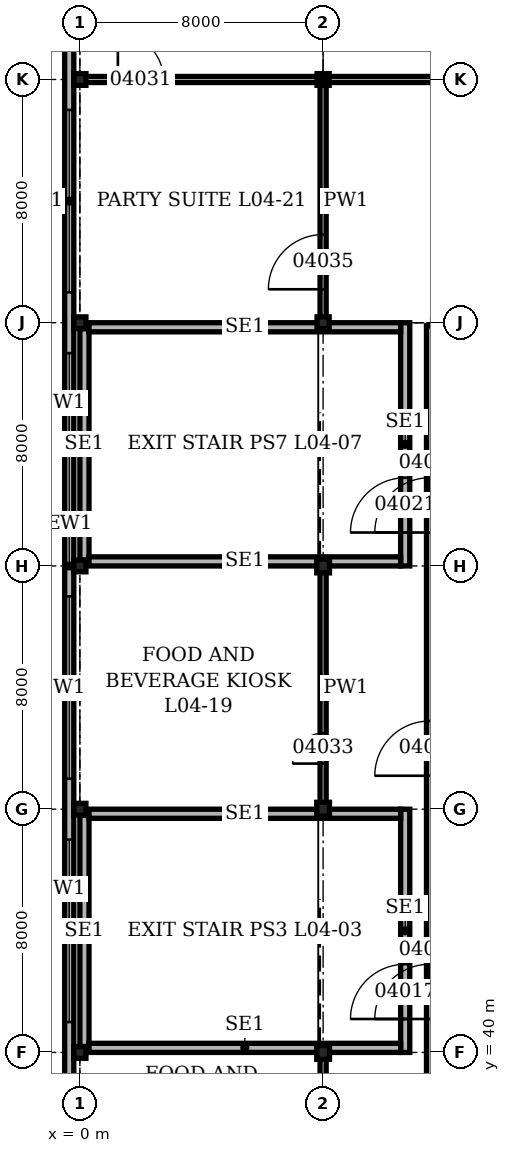
"""IFC4 building model, lengths in metres.
Left out: names, types, materials, properties, quantities, classifications, styles, units other than length and angle.
Written with IfcOpenShell. Run it as: python <this file> out.ifc"""

import sys

from ifc_helpers import new_model, si_unit, direction, frame, frame_2d, origin, origin_2d, place, context, subcontext, project, spatial, rectangle, i_section, extrude, element, fill, save


model = new_model("IFC4")
c1 = context("Model", 3, precision=1e-05, world=origin(), true_north=direction((0.0, 1.0)))
c2 = subcontext(c1, "Body", "Model", "MODEL_VIEW")
j1 = project(units=[si_unit("LENGTHUNIT", "METRE"), si_unit("PLANEANGLEUNIT", "RADIAN")], contexts=[c1])
p1 = place(None, origin())
s1 = spatial("IfcSite", under=j1, at=p1, CompositionType="ELEMENT")
p2 = place(p1, origin())
s2 = spatial("IfcBuilding", under=s1, at=p2, CompositionType="ELEMENT")
p3 = place(p2, frame((0.0, 0.0, 19.9)))
s3 = spatial("IfcBuildingStorey", under=s2, at=p3, CompositionType="ELEMENT", Elevation=19.9)
for number, where, z_axis, x_axis in (
    (1, (0.0, 40.0, 0.0), (0.0, 0.0, 1.0), (1.0, 0.0, 0.0)),
    (2, (0.0, 48.0, 0.0), (0.0, 0.0, 1.0), (1.0, 0.0, 0.0)),
    (3, (0.0, 56.0, 0.0), (0.0, 0.0, 1.0), (1.0, 0.0, 0.0)),
    (4, (0.0, 64.0, 0.0), (0.0, 0.0, 1.0), (1.0, 0.0, 0.0)),
    (5, (0.0, 72.0, 0.0), (0.0, 0.0, 1.0), (1.0, 0.0, 0.0)),
):
    element("IfcColumn", number, at=place(p3, frame(where, z_axis=z_axis, x_axis=x_axis)), inside=s3, PredefinedType="COLUMN", context=c2, shape_type="SweptSolid", body=[
        extrude(i_section(OverallWidth=0.399, OverallDepth=0.386, WebThickness=0.021, FlangeThickness=0.033, at=origin_2d()), origin(), (0.0, 0.0, 1.0), 6.0),
    ])
for number, where, z_axis, x_axis in (
    (6, (8.0, 40.0, 0.0), (0.0, 0.0, 1.0), (1.0, 0.0, 0.0)),
    (7, (8.0, 48.0, 0.0), (0.0, 0.0, 1.0), (1.0, 0.0, 0.0)),
    (8, (8.0, 56.0, 0.0), (0.0, 0.0, 1.0), (1.0, 0.0, 0.0)),
):
    element("IfcColumn", number, at=place(p3, frame(where, z_axis=z_axis, x_axis=x_axis)), inside=s3, PredefinedType="COLUMN", context=c2, shape_type="SweptSolid", body=[
        extrude(i_section(OverallWidth=0.419, OverallDepth=0.455, WebThickness=0.042, FlangeThickness=0.068, at=origin_2d()), origin(), (0.0, 0.0, 1.0), 6.0),
    ])
for number, where, z_axis, x_axis in (
    (9, (8.0, 64.0, 0.0), (0.0, 0.0, 1.0), (1.0, 0.0, 0.0)),
    (10, (8.0, 72.0, 0.0), (0.0, 0.0, 1.0), (1.0, 0.0, 0.0)),
):
    element("IfcColumn", number, at=place(p3, frame(where, z_axis=z_axis, x_axis=x_axis)), inside=s3, PredefinedType="COLUMN", context=c2, shape_type="SweptSolid", body=[
        extrude(i_section(OverallWidth=0.399, OverallDepth=0.386, WebThickness=0.021, FlangeThickness=0.033, at=origin_2d()), origin(), (0.0, 0.0, 1.0), 6.0),
    ])
p4 = place(p3, frame((-0.35, 112.35, 0.0), z_axis=(0.0, 0.0, 1.0), x_axis=(0.0, -1.0, 0.0)))
e11 = element("IfcWall", 11, at=p4, inside=s3, PredefinedType="SOLIDWALL", context=c2, shape_type="SweptSolid", body=[
    extrude(rectangle(XDim=112.7, YDim=0.3, at=frame_2d((56.35, 0.0))), origin(), (0.0, 0.0, 1.0), 6.0),
])
p5 = place(p4, frame((1.35, 0.0, 1.0)))
e12 = element("IfcOpeningElement", 12, at=p5, cuts=e11, PredefinedType="OPENING", context=c2, shape_type="SweptSolid", body=[
    extrude(rectangle(XDim=6.0, YDim=1.5, at=frame_2d((3.0, 0.75))), frame((0.0, 0.16, 0.0), z_axis=(0.0, -1.0, 0.0), x_axis=(1.0, 0.0, 0.0)), (0.0, 0.0, 1.0), 0.32),
])
p6 = place(p4, frame((9.35, 0.0, 1.0)))
e13 = element("IfcOpeningElement", 13, at=p6, cuts=e11, PredefinedType="OPENING", context=c2, shape_type="SweptSolid", body=[
    extrude(rectangle(XDim=6.0, YDim=1.5, at=frame_2d((3.0, 0.75))), frame((0.0, 0.16, 0.0), z_axis=(0.0, -1.0, 0.0), x_axis=(1.0, 0.0, 0.0)), (0.0, 0.0, 1.0), 0.32),
])
p7 = place(p4, frame((17.35, 0.0, 1.0)))
e14 = element("IfcOpeningElement", 14, at=p7, cuts=e11, PredefinedType="OPENING", context=c2, shape_type="SweptSolid", body=[
    extrude(rectangle(XDim=6.0, YDim=1.5, at=frame_2d((3.0, 0.75))), frame((0.0, 0.16, 0.0), z_axis=(0.0, -1.0, 0.0), x_axis=(1.0, 0.0, 0.0)), (0.0, 0.0, 1.0), 0.32),
])
p8 = place(p4, frame((25.35, 0.0, 1.0)))
e15 = element("IfcOpeningElement", 15, at=p8, cuts=e11, PredefinedType="OPENING", context=c2, shape_type="SweptSolid", body=[
    extrude(rectangle(XDim=6.0, YDim=1.5, at=frame_2d((3.0, 0.75))), frame((0.0, 0.16, 0.0), z_axis=(0.0, -1.0, 0.0), x_axis=(1.0, 0.0, 0.0)), (0.0, 0.0, 1.0), 0.32),
])
p9 = place(p4, frame((33.35, 0.0, 1.0)))
e16 = element("IfcOpeningElement", 16, at=p9, cuts=e11, PredefinedType="OPENING", context=c2, shape_type="SweptSolid", body=[
    extrude(rectangle(XDim=6.0, YDim=1.5, at=frame_2d((3.0, 0.75))), frame((0.0, 0.16, 0.0), z_axis=(0.0, -1.0, 0.0), x_axis=(1.0, 0.0, 0.0)), (0.0, 0.0, 1.0), 0.32),
])
p10 = place(p4, frame((41.35, 0.0, 1.0)))
e17 = element("IfcOpeningElement", 17, at=p10, cuts=e11, PredefinedType="OPENING", context=c2, shape_type="SweptSolid", body=[
    extrude(rectangle(XDim=6.0, YDim=1.5, at=frame_2d((3.0, 0.75))), frame((0.0, 0.16, 0.0), z_axis=(0.0, -1.0, 0.0), x_axis=(1.0, 0.0, 0.0)), (0.0, 0.0, 1.0), 0.32),
])
p11 = place(p4, frame((49.35, 0.0, 1.0)))
e18 = element("IfcOpeningElement", 18, at=p11, cuts=e11, PredefinedType="OPENING", context=c2, shape_type="SweptSolid", body=[
    extrude(rectangle(XDim=6.0, YDim=1.5, at=frame_2d((3.0, 0.75))), frame((0.0, 0.16, 0.0), z_axis=(0.0, -1.0, 0.0), x_axis=(1.0, 0.0, 0.0)), (0.0, 0.0, 1.0), 0.32),
])
p12 = place(p4, frame((57.35, 0.0, 1.0)))
e19 = element("IfcOpeningElement", 19, at=p12, cuts=e11, PredefinedType="OPENING", context=c2, shape_type="SweptSolid", body=[
    extrude(rectangle(XDim=6.0, YDim=1.5, at=frame_2d((3.0, 0.75))), frame((0.0, 0.16, 0.0), z_axis=(0.0, -1.0, 0.0), x_axis=(1.0, 0.0, 0.0)), (0.0, 0.0, 1.0), 0.32),
])
p13 = place(p4, frame((65.35, 0.0, 1.0)))
e20 = element("IfcOpeningElement", 20, at=p13, cuts=e11, PredefinedType="OPENING", context=c2, shape_type="SweptSolid", body=[
    extrude(rectangle(XDim=6.0, YDim=1.5, at=frame_2d((3.0, 0.75))), frame((0.0, 0.16, 0.0), z_axis=(0.0, -1.0, 0.0), x_axis=(1.0, 0.0, 0.0)), (0.0, 0.0, 1.0), 0.32),
])
p14 = place(p4, frame((73.35, 0.0, 1.0)))
e21 = element("IfcOpeningElement", 21, at=p14, cuts=e11, PredefinedType="OPENING", context=c2, shape_type="SweptSolid", body=[
    extrude(rectangle(XDim=6.0, YDim=1.5, at=frame_2d((3.0, 0.75))), frame((0.0, 0.16, 0.0), z_axis=(0.0, -1.0, 0.0), x_axis=(1.0, 0.0, 0.0)), (0.0, 0.0, 1.0), 0.32),
])
p15 = place(p4, frame((81.35, 0.0, 1.0)))
e22 = element("IfcOpeningElement", 22, at=p15, cuts=e11, PredefinedType="OPENING", context=c2, shape_type="SweptSolid", body=[
    extrude(rectangle(XDim=6.0, YDim=1.5, at=frame_2d((3.0, 0.75))), frame((0.0, 0.16, 0.0), z_axis=(0.0, -1.0, 0.0), x_axis=(1.0, 0.0, 0.0)), (0.0, 0.0, 1.0), 0.32),
])
p16 = place(p4, frame((89.35, 0.0, 1.0)))
e23 = element("IfcOpeningElement", 23, at=p16, cuts=e11, PredefinedType="OPENING", context=c2, shape_type="SweptSolid", body=[
    extrude(rectangle(XDim=6.0, YDim=1.5, at=frame_2d((3.0, 0.75))), frame((0.0, 0.16, 0.0), z_axis=(0.0, -1.0, 0.0), x_axis=(1.0, 0.0, 0.0)), (0.0, 0.0, 1.0), 0.32),
])
p17 = place(p4, frame((97.35, 0.0, 1.0)))
e24 = element("IfcOpeningElement", 24, at=p17, cuts=e11, PredefinedType="OPENING", context=c2, shape_type="SweptSolid", body=[
    extrude(rectangle(XDim=6.0, YDim=1.5, at=frame_2d((3.0, 0.75))), frame((0.0, 0.16, 0.0), z_axis=(0.0, -1.0, 0.0), x_axis=(1.0, 0.0, 0.0)), (0.0, 0.0, 1.0), 0.32),
])
p18 = place(p4, frame((105.35, 0.0, 1.0)))
e25 = element("IfcOpeningElement", 25, at=p18, cuts=e11, PredefinedType="OPENING", context=c2, shape_type="SweptSolid", body=[
    extrude(rectangle(XDim=6.0, YDim=1.5, at=frame_2d((3.0, 0.75))), frame((0.0, 0.16, 0.0), z_axis=(0.0, -1.0, 0.0), x_axis=(1.0, 0.0, 0.0)), (0.0, 0.0, 1.0), 0.32),
])
p19 = place(p3, frame((0.15, 40.193, 0.0), z_axis=(0.0, 0.0, 1.0), x_axis=(0.0, 1.0, 0.0)))
e26 = element("IfcWall", 26, at=p19, inside=s3, PredefinedType="SOLIDWALL", context=c2, shape_type="SweptSolid", body=[
    extrude(rectangle(XDim=7.614, YDim=0.3, at=frame_2d((3.807, 0.0))), origin(), (0.0, 0.0, 1.0), 5.75),
])
p20 = place(p3, frame((10.7, 40.0, 0.0), z_axis=(0.0, 0.0, 1.0), x_axis=(0.0, 1.0, 0.0)))
e27 = element("IfcWall", 27, at=p20, inside=s3, PredefinedType="SOLIDWALL", context=c2, shape_type="SweptSolid", body=[
    extrude(rectangle(XDim=8.0, YDim=0.3, at=frame_2d((4.0, 0.0))), origin(), (0.0, 0.0, 1.0), 5.75),
])
p21 = place(p20, frame((1.1, 0.0, 0.0)))
e28 = element("IfcOpeningElement", 28, at=p21, cuts=e27, PredefinedType="OPENING", context=c2, shape_type="SweptSolid", body=[
    extrude(rectangle(XDim=1.8, YDim=2.1, at=frame_2d((0.9, 1.05))), frame((0.0, 0.16, 0.0), z_axis=(0.0, -1.0, 0.0), x_axis=(1.0, 0.0, 0.0)), (0.0, 0.0, 1.0), 0.32),
])
for number, where, z_axis, x_axis in (
    (29, (0.3, 40.15, 0.0), (0.0, 0.0, 1.0), (1.0, 0.0, 0.0)),
    (30, (0.3, 47.85, 0.0), (0.0, 0.0, 1.0), (1.0, 0.0, 0.0)),
):
    element("IfcWall", number, at=place(p3, frame(where, z_axis=z_axis, x_axis=x_axis)), inside=s3, PredefinedType="SOLIDWALL", context=c2, shape_type="SweptSolid", body=[
        extrude(rectangle(XDim=10.25, YDim=0.3, at=frame_2d((5.125, 0.0))), origin(), (0.0, 0.0, 1.0), 5.75),
    ])
p22 = place(p3, frame((0.15, 56.193, 0.0), z_axis=(0.0, 0.0, 1.0), x_axis=(0.0, 1.0, 0.0)))
e31 = element("IfcWall", 31, at=p22, inside=s3, PredefinedType="SOLIDWALL", context=c2, shape_type="SweptSolid", body=[
    extrude(rectangle(XDim=7.614, YDim=0.3, at=frame_2d((3.807, 0.0))), origin(), (0.0, 0.0, 1.0), 5.75),
])
p23 = place(p3, frame((10.7, 56.0, 0.0), z_axis=(0.0, 0.0, 1.0), x_axis=(0.0, 1.0, 0.0)))
e32 = element("IfcWall", 32, at=p23, inside=s3, PredefinedType="SOLIDWALL", context=c2, shape_type="SweptSolid", body=[
    extrude(rectangle(XDim=8.0, YDim=0.3, at=frame_2d((4.0, 0.0))), origin(), (0.0, 0.0, 1.0), 5.75),
])
p24 = place(p23, frame((1.1, 0.0, 0.0)))
e33 = element("IfcOpeningElement", 33, at=p24, cuts=e32, PredefinedType="OPENING", context=c2, shape_type="SweptSolid", body=[
    extrude(rectangle(XDim=1.8, YDim=2.1, at=frame_2d((0.9, 1.05))), frame((0.0, 0.16, 0.0), z_axis=(0.0, -1.0, 0.0), x_axis=(1.0, 0.0, 0.0)), (0.0, 0.0, 1.0), 0.32),
])
for number, where, z_axis, x_axis in (
    (34, (0.3, 56.15, 0.0), (0.0, 0.0, 1.0), (1.0, 0.0, 0.0)),
    (35, (0.3, 63.85, 0.0), (0.0, 0.0, 1.0), (1.0, 0.0, 0.0)),
):
    element("IfcWall", number, at=place(p3, frame(where, z_axis=z_axis, x_axis=x_axis)), inside=s3, PredefinedType="SOLIDWALL", context=c2, shape_type="SweptSolid", body=[
        extrude(rectangle(XDim=10.25, YDim=0.3, at=frame_2d((5.125, 0.0))), origin(), (0.0, 0.0, 1.0), 5.75),
    ])
p25 = place(p3, frame((0.0, 72.0, 0.0), z_axis=(0.0, 0.0, 1.0), x_axis=(1.0, 0.0, 0.0)))
e36 = element("IfcWall", 36, at=p25, inside=s3, PredefinedType="PARTITIONING", context=c2, shape_type="SweptSolid", body=[
    extrude(rectangle(XDim=16.0, YDim=0.2, at=frame_2d((8.0, 0.0))), origin(), (0.0, 0.0, 1.0), 4.978),
])
p26 = place(p25, frame((1.25, 0.0, 0.0)))
e37 = element("IfcOpeningElement", 37, at=p26, cuts=e36, PredefinedType="OPENING", context=c2, shape_type="SweptSolid", body=[
    extrude(rectangle(XDim=1.5, YDim=2.4, at=frame_2d((0.75, 1.2))), frame((0.0, 0.11, 0.0), z_axis=(0.0, -1.0, 0.0), x_axis=(1.0, 0.0, 0.0)), (0.0, 0.0, 1.0), 0.22),
])
p27 = place(p3, frame((8.0, -0.15, 0.0), z_axis=(0.0, 0.0, 1.0), x_axis=(0.0, 1.0, 0.0)))
e38 = element("IfcWall", 38, at=p27, inside=s3, PredefinedType="PARTITIONING", context=c2, shape_type="SweptSolid", body=[
    extrude(rectangle(XDim=40.05, YDim=0.2, at=frame_2d((20.025, 0.0))), origin(), (0.0, 0.0, 1.0), 4.978),
])
p28 = place(p27, frame((17.55, 0.0, 0.0)))
e39 = element("IfcOpeningElement", 39, at=p28, cuts=e38, PredefinedType="OPENING", context=c2, shape_type="SweptSolid", body=[
    extrude(rectangle(XDim=1.2, YDim=2.1, at=frame_2d((0.6, 1.05))), frame((0.0, 0.11, 0.0), z_axis=(0.0, -1.0, 0.0), x_axis=(1.0, 0.0, 0.0)), (0.0, 0.0, 1.0), 0.22),
])
p29 = place(p27, frame((27.05, 0.0, 0.0)))
e40 = element("IfcOpeningElement", 40, at=p29, cuts=e38, PredefinedType="OPENING", context=c2, shape_type="SweptSolid", body=[
    extrude(rectangle(XDim=1.2, YDim=2.1, at=frame_2d((0.6, 1.05))), frame((0.0, 0.11, 0.0), z_axis=(0.0, -1.0, 0.0), x_axis=(1.0, 0.0, 0.0)), (0.0, 0.0, 1.0), 0.22),
])
p30 = place(p27, frame((33.55, 0.0, 0.0)))
e41 = element("IfcOpeningElement", 41, at=p30, cuts=e38, PredefinedType="OPENING", context=c2, shape_type="SweptSolid", body=[
    extrude(rectangle(XDim=1.2, YDim=2.1, at=frame_2d((0.6, 1.05))), frame((0.0, 0.11, 0.0), z_axis=(0.0, -1.0, 0.0), x_axis=(1.0, 0.0, 0.0)), (0.0, 0.0, 1.0), 0.22),
])
p31 = place(p27, frame((1.65, 0.0, 0.0)))
e42 = element("IfcOpeningElement", 42, at=p31, cuts=e38, PredefinedType="OPENING", context=c2, shape_type="SweptSolid", body=[
    extrude(rectangle(XDim=1.0, YDim=2.1, at=frame_2d((0.5, 1.05))), frame((0.0, 0.11, 0.0), z_axis=(0.0, -1.0, 0.0), x_axis=(1.0, 0.0, 0.0)), (0.0, 0.0, 1.0), 0.22),
])
p32 = place(p27, frame((9.65, 0.0, 0.0)))
e43 = element("IfcOpeningElement", 43, at=p32, cuts=e38, PredefinedType="OPENING", context=c2, shape_type="SweptSolid", body=[
    extrude(rectangle(XDim=1.0, YDim=2.1, at=frame_2d((0.5, 1.05))), frame((0.0, 0.11, 0.0), z_axis=(0.0, -1.0, 0.0), x_axis=(1.0, 0.0, 0.0)), (0.0, 0.0, 1.0), 0.22),
])
p33 = place(p27, frame((37.65, 0.0, 0.0)))
e44 = element("IfcOpeningElement", 44, at=p33, cuts=e38, PredefinedType="OPENING", context=c2, shape_type="SweptSolid", body=[
    extrude(rectangle(XDim=1.0, YDim=2.1, at=frame_2d((0.5, 1.05))), frame((0.0, 0.11, 0.0), z_axis=(0.0, -1.0, 0.0), x_axis=(1.0, 0.0, 0.0)), (0.0, 0.0, 1.0), 0.22),
])
p34 = place(p3, frame((8.0, 48.1, 0.0), z_axis=(0.0, 0.0, 1.0), x_axis=(0.0, 1.0, 0.0)))
e45 = element("IfcWall", 45, at=p34, inside=s3, PredefinedType="PARTITIONING", context=c2, shape_type="SweptSolid", body=[
    extrude(rectangle(XDim=7.8, YDim=0.2, at=frame_2d((3.9, 0.0))), origin(), (0.0, 0.0, 1.0), 4.978),
])
p35 = place(p34, frame((1.4, 0.0, 0.0)))
e46 = element("IfcOpeningElement", 46, at=p35, cuts=e45, PredefinedType="OPENING", context=c2, shape_type="SweptSolid", body=[
    extrude(rectangle(XDim=1.0, YDim=2.1, at=frame_2d((0.5, 1.05))), frame((0.0, 0.11, 0.0), z_axis=(0.0, -1.0, 0.0), x_axis=(1.0, 0.0, 0.0)), (0.0, 0.0, 1.0), 0.22),
])
p36 = place(p3, frame((8.0, 64.1, 0.0), z_axis=(0.0, 0.0, 1.0), x_axis=(0.0, 1.0, 0.0)))
e47 = element("IfcWall", 47, at=p36, inside=s3, PredefinedType="PARTITIONING", context=c2, shape_type="SweptSolid", body=[
    extrude(rectangle(XDim=7.8, YDim=0.2, at=frame_2d((3.9, 0.0))), origin(), (0.0, 0.0, 1.0), 4.978),
])
p37 = place(p36, frame((1.0, 0.0, 0.0)))
e48 = element("IfcOpeningElement", 48, at=p37, cuts=e47, PredefinedType="OPENING", context=c2, shape_type="SweptSolid", body=[
    extrude(rectangle(XDim=1.8, YDim=2.4, at=frame_2d((0.9, 1.2))), frame((0.0, 0.11, 0.0), z_axis=(0.0, -1.0, 0.0), x_axis=(1.0, 0.0, 0.0)), (0.0, 0.0, 1.0), 0.22),
])
p38 = place(p3, frame((11.5, 8.6, 0.0), z_axis=(0.0, 0.0, 1.0), x_axis=(0.0, 1.0, 0.0)))
e49 = element("IfcWall", 49, at=p38, inside=s3, PredefinedType="PARTITIONING", context=c2, shape_type="SweptSolid", body=[
    extrude(rectangle(XDim=55.3, YDim=0.2, at=frame_2d((27.65, 0.0))), origin(), (0.0, 0.0, 1.0), 5.75),
])
p39 = place(p38, frame((1.0, 0.0, 0.0)))
e50 = element("IfcOpeningElement", 50, at=p39, cuts=e49, PredefinedType="OPENING", context=c2, shape_type="SweptSolid", body=[
    extrude(rectangle(XDim=1.8, YDim=2.4, at=frame_2d((0.9, 1.2))), frame((0.0, 0.11, 0.0), z_axis=(0.0, -1.0, 0.0), x_axis=(1.0, 0.0, 0.0)), (0.0, 0.0, 1.0), 0.22),
])
p40 = place(p38, frame((8.5, 0.0, 0.0)))
e51 = element("IfcOpeningElement", 51, at=p40, cuts=e49, PredefinedType="OPENING", context=c2, shape_type="SweptSolid", body=[
    extrude(rectangle(XDim=1.8, YDim=2.4, at=frame_2d((0.9, 1.2))), frame((0.0, 0.11, 0.0), z_axis=(0.0, -1.0, 0.0), x_axis=(1.0, 0.0, 0.0)), (0.0, 0.0, 1.0), 0.22),
])
p41 = place(p38, frame((16.5, 0.0, 0.0)))
e52 = element("IfcOpeningElement", 52, at=p41, cuts=e49, PredefinedType="OPENING", context=c2, shape_type="SweptSolid", body=[
    extrude(rectangle(XDim=1.8, YDim=2.4, at=frame_2d((0.9, 1.2))), frame((0.0, 0.11, 0.0), z_axis=(0.0, -1.0, 0.0), x_axis=(1.0, 0.0, 0.0)), (0.0, 0.0, 1.0), 0.22),
])
p42 = place(p38, frame((24.5, 0.0, 0.0)))
e53 = element("IfcOpeningElement", 53, at=p42, cuts=e49, PredefinedType="OPENING", context=c2, shape_type="SweptSolid", body=[
    extrude(rectangle(XDim=1.8, YDim=2.4, at=frame_2d((0.9, 1.2))), frame((0.0, 0.11, 0.0), z_axis=(0.0, -1.0, 0.0), x_axis=(1.0, 0.0, 0.0)), (0.0, 0.0, 1.0), 0.22),
])
p43 = place(p38, frame((32.5, 0.0, 0.0)))
e54 = element("IfcOpeningElement", 54, at=p43, cuts=e49, PredefinedType="OPENING", context=c2, shape_type="SweptSolid", body=[
    extrude(rectangle(XDim=1.8, YDim=2.4, at=frame_2d((0.9, 1.2))), frame((0.0, 0.11, 0.0), z_axis=(0.0, -1.0, 0.0), x_axis=(1.0, 0.0, 0.0)), (0.0, 0.0, 1.0), 0.22),
])
p44 = place(p38, frame((40.5, 0.0, 0.0)))
e55 = element("IfcOpeningElement", 55, at=p44, cuts=e49, PredefinedType="OPENING", context=c2, shape_type="SweptSolid", body=[
    extrude(rectangle(XDim=1.8, YDim=2.4, at=frame_2d((0.9, 1.2))), frame((0.0, 0.11, 0.0), z_axis=(0.0, -1.0, 0.0), x_axis=(1.0, 0.0, 0.0)), (0.0, 0.0, 1.0), 0.22),
])
p45 = place(p38, frame((48.5, 0.0, 0.0)))
e56 = element("IfcOpeningElement", 56, at=p45, cuts=e49, PredefinedType="OPENING", context=c2, shape_type="SweptSolid", body=[
    extrude(rectangle(XDim=1.8, YDim=2.4, at=frame_2d((0.9, 1.2))), frame((0.0, 0.11, 0.0), z_axis=(0.0, -1.0, 0.0), x_axis=(1.0, 0.0, 0.0)), (0.0, 0.0, 1.0), 0.22),
])
p46 = place(p10, origin())
e57 = element("IfcWindow", 57, at=p46, inside=s3, PartitioningType="SINGLE_PANEL", PredefinedType="WINDOW", context=c2, shape_type="SweptSolid", body=[
    extrude(rectangle(XDim=6.0, YDim=1.5, at=frame_2d((3.0, 0.75))), frame((0.0, 0.03, 0.0), z_axis=(0.0, -1.0, 0.0), x_axis=(1.0, 0.0, 0.0)), (0.0, 0.0, 1.0), 0.06),
])
fill(e17, e57)
p47 = place(p11, origin())
e58 = element("IfcWindow", 58, at=p47, inside=s3, PartitioningType="SINGLE_PANEL", PredefinedType="WINDOW", context=c2, shape_type="SweptSolid", body=[
    extrude(rectangle(XDim=6.0, YDim=1.5, at=frame_2d((3.0, 0.75))), frame((0.0, 0.03, 0.0), z_axis=(0.0, -1.0, 0.0), x_axis=(1.0, 0.0, 0.0)), (0.0, 0.0, 1.0), 0.06),
])
fill(e18, e58)
p48 = place(p12, origin())
e59 = element("IfcWindow", 59, at=p48, inside=s3, PartitioningType="SINGLE_PANEL", PredefinedType="WINDOW", context=c2, shape_type="SweptSolid", body=[
    extrude(rectangle(XDim=6.0, YDim=1.5, at=frame_2d((3.0, 0.75))), frame((0.0, 0.03, 0.0), z_axis=(0.0, -1.0, 0.0), x_axis=(1.0, 0.0, 0.0)), (0.0, 0.0, 1.0), 0.06),
])
fill(e19, e59)
p49 = place(p13, origin())
e60 = element("IfcWindow", 60, at=p49, inside=s3, PartitioningType="SINGLE_PANEL", PredefinedType="WINDOW", context=c2, shape_type="SweptSolid", body=[
    extrude(rectangle(XDim=6.0, YDim=1.5, at=frame_2d((3.0, 0.75))), frame((0.0, 0.03, 0.0), z_axis=(0.0, -1.0, 0.0), x_axis=(1.0, 0.0, 0.0)), (0.0, 0.0, 1.0), 0.06),
])
fill(e20, e60)
p50 = place(p21, origin())
e61 = element("IfcDoor", 61, at=p50, inside=s3, OperationType="DOUBLE_DOOR_SINGLE_SWING", PredefinedType="DOOR", context=c2, shape_type="SweptSolid", body=[
    extrude(rectangle(XDim=1.8, YDim=2.1, at=frame_2d((0.9, 1.05))), frame((0.0, 0.15, 0.0), z_axis=(0.0, -1.0, 0.0), x_axis=(1.0, 0.0, 0.0)), (0.0, 0.0, 1.0), 0.3),
])
fill(e28, e61)
p51 = place(p24, origin())
e62 = element("IfcDoor", 62, at=p51, inside=s3, OperationType="DOUBLE_DOOR_SINGLE_SWING", PredefinedType="DOOR", context=c2, shape_type="SweptSolid", body=[
    extrude(rectangle(XDim=1.8, YDim=2.1, at=frame_2d((0.9, 1.05))), frame((0.0, 0.15, 0.0), z_axis=(0.0, -1.0, 0.0), x_axis=(1.0, 0.0, 0.0)), (0.0, 0.0, 1.0), 0.3),
])
fill(e33, e62)
p52 = place(p26, origin())
e63 = element("IfcDoor", 63, at=p52, inside=s3, OperationType="DOUBLE_DOOR_SINGLE_SWING", PredefinedType="DOOR", context=c2, shape_type="SweptSolid", body=[
    extrude(rectangle(XDim=1.5, YDim=2.4, at=frame_2d((0.75, 1.2))), frame((0.0, 0.1, 0.0), z_axis=(0.0, -1.0, 0.0), x_axis=(1.0, 0.0, 0.0)), (0.0, 0.0, 1.0), 0.199),
])
fill(e37, e63)
p53 = place(p35, origin())
e64 = element("IfcDoor", 64, at=p53, inside=s3, OperationType="SINGLE_SWING_LEFT", PredefinedType="DOOR", context=c2, shape_type="SweptSolid", body=[
    extrude(rectangle(XDim=1.0, YDim=2.1, at=frame_2d((0.5, 1.05))), frame((0.0, 0.1, 0.0), z_axis=(0.0, -1.0, 0.0), x_axis=(1.0, 0.0, 0.0)), (0.0, 0.0, 1.0), 0.199),
])
fill(e46, e64)
p54 = place(p37, origin())
e65 = element("IfcDoor", 65, at=p54, inside=s3, OperationType="DOUBLE_DOOR_DOUBLE_SWING", PredefinedType="DOOR", context=c2, shape_type="SweptSolid", body=[
    extrude(rectangle(XDim=1.8, YDim=2.4, at=frame_2d((0.9, 1.2))), frame((0.0, 0.1, 0.0), z_axis=(0.0, -1.0, 0.0), x_axis=(1.0, 0.0, 0.0)), (0.0, 0.0, 1.0), 0.199),
])
fill(e48, e65)
p55 = place(p43, origin())
e66 = element("IfcDoor", 66, at=p55, inside=s3, OperationType="DOUBLE_DOOR_DOUBLE_SWING", PredefinedType="DOOR", context=c2, shape_type="SweptSolid", body=[
    extrude(rectangle(XDim=1.8, YDim=2.4, at=frame_2d((0.9, 1.2))), frame((0.0, 0.1, 0.0), z_axis=(0.0, -1.0, 0.0), x_axis=(1.0, 0.0, 0.0)), (0.0, 0.0, 1.0), 0.199),
])
fill(e54, e66)
p56 = place(p44, origin())
e67 = element("IfcDoor", 67, at=p56, inside=s3, OperationType="DOUBLE_DOOR_DOUBLE_SWING", PredefinedType="DOOR", context=c2, shape_type="SweptSolid", body=[
    extrude(rectangle(XDim=1.8, YDim=2.4, at=frame_2d((0.9, 1.2))), frame((0.0, 0.1, 0.0), z_axis=(0.0, -1.0, 0.0), x_axis=(1.0, 0.0, 0.0)), (0.0, 0.0, 1.0), 0.199),
])
fill(e55, e67)
p57 = place(p45, origin())
e68 = element("IfcDoor", 68, at=p57, inside=s3, OperationType="DOUBLE_DOOR_DOUBLE_SWING", PredefinedType="DOOR", context=c2, shape_type="SweptSolid", body=[
    extrude(rectangle(XDim=1.8, YDim=2.4, at=frame_2d((0.9, 1.2))), frame((0.0, 0.1, 0.0), z_axis=(0.0, -1.0, 0.0), x_axis=(1.0, 0.0, 0.0)), (0.0, 0.0, 1.0), 0.199),
])
fill(e56, e68)
save(model, sys.argv[1])
